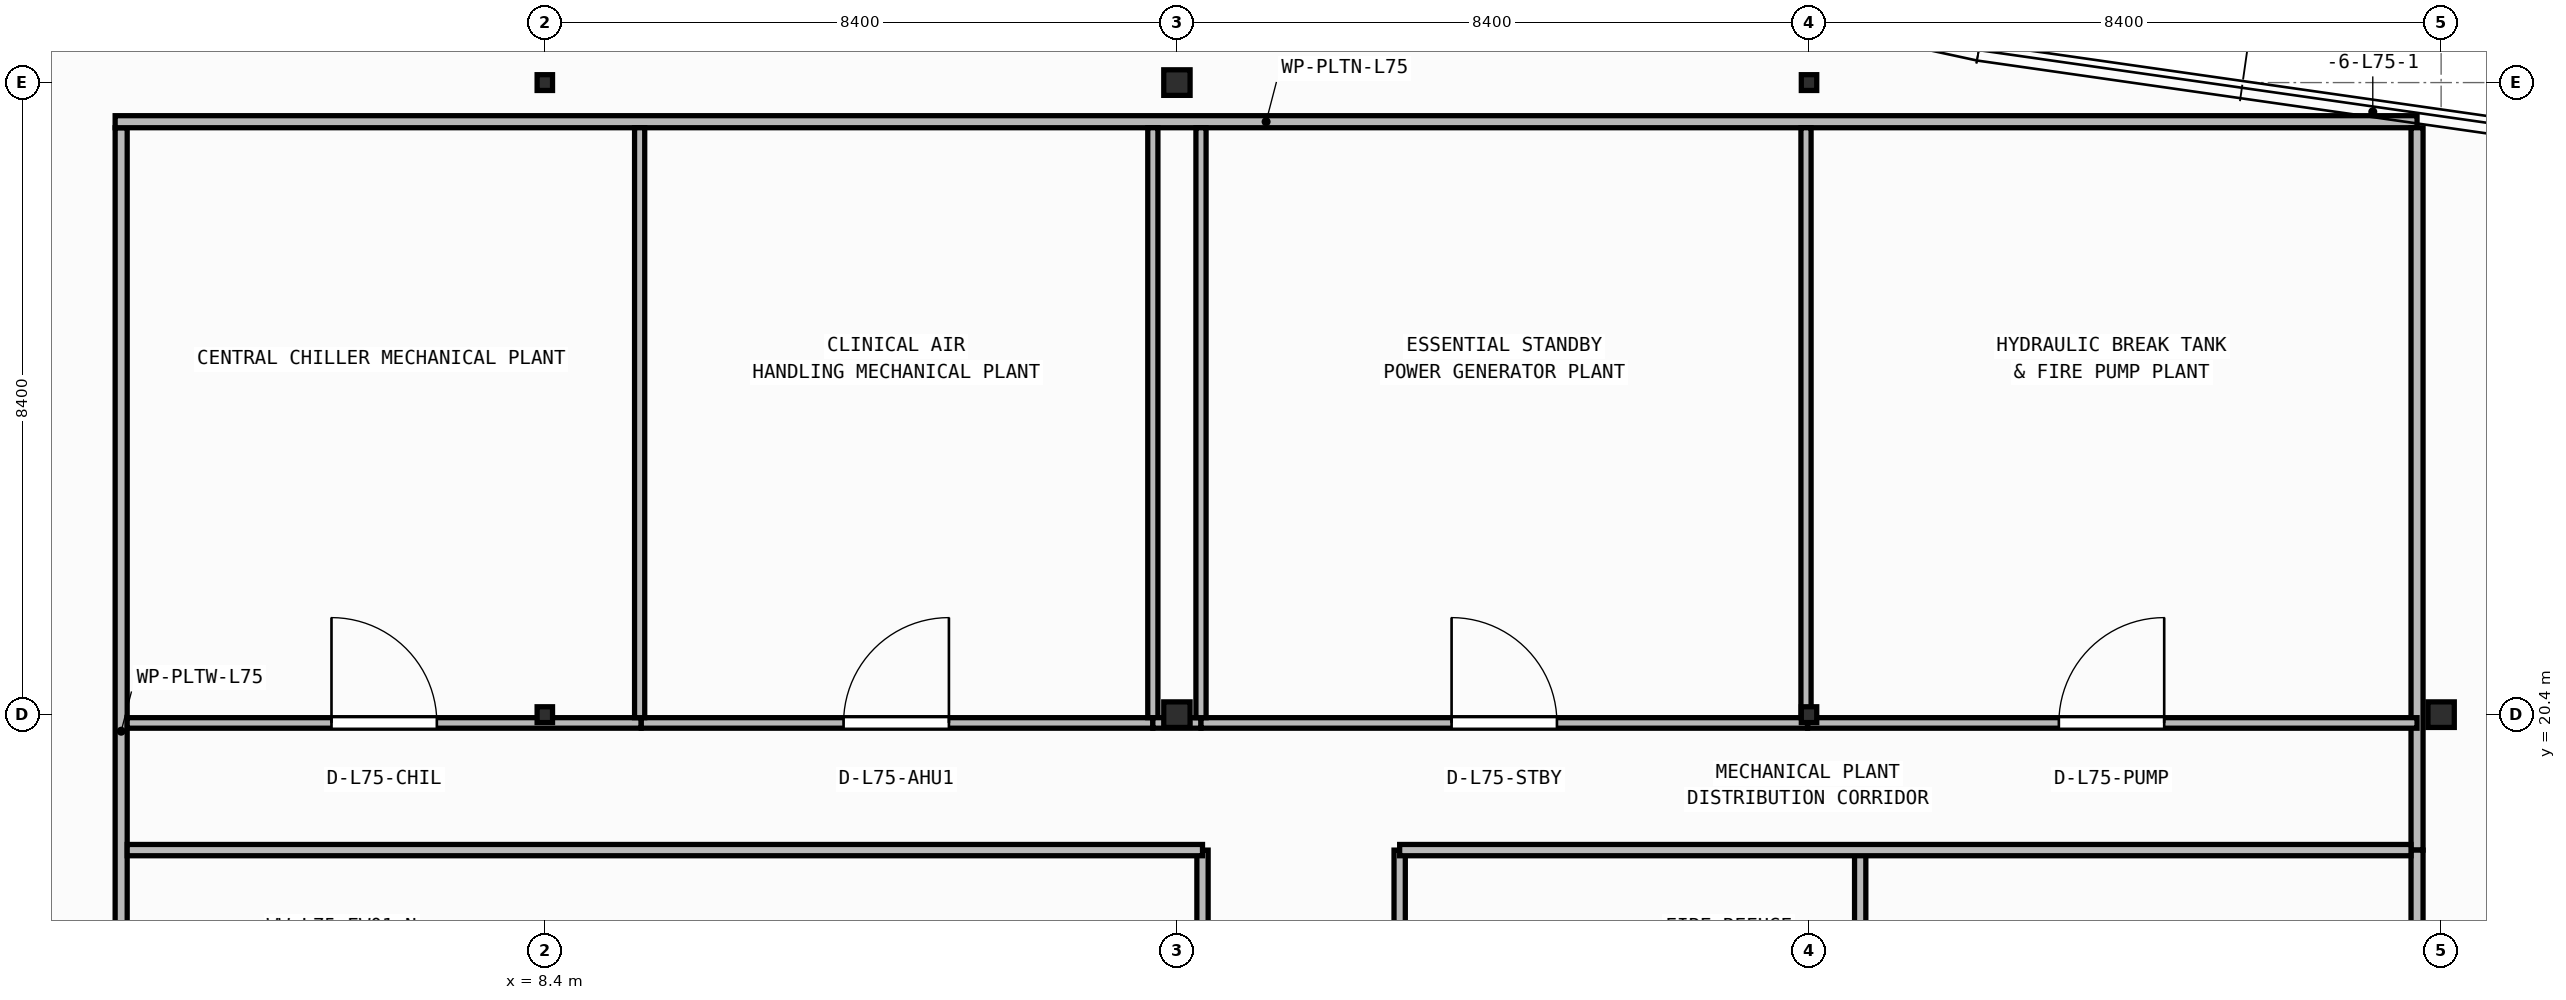
"""IFC4 building model, lengths in metres.
Left out: names, types, materials, properties, quantities, classifications, styles, units other than length and angle.
Written with IfcOpenShell. Run it as: python <this file> out.ifc"""

import sys

from ifc_helpers import new_model, si_unit, direction, frame, frame_2d, origin, origin_2d, place, context, subcontext, project, spatial, rectangle, i_section, extrude, element, fill, save


model = new_model("IFC4")
c1 = context("Model", 3, precision=1e-05, world=origin(), true_north=direction((0.0, 1.0)))
c2 = subcontext(c1, "Body", "Model", "MODEL_VIEW")
j1 = project(units=[si_unit("LENGTHUNIT", "METRE"), si_unit("PLANEANGLEUNIT", "RADIAN")], contexts=[c1])
p1 = place(None, origin())
s1 = spatial("IfcSite", under=j1, at=p1, CompositionType="ELEMENT")
p2 = place(p1, origin())
s2 = spatial("IfcBuilding", under=s1, at=p2, CompositionType="ELEMENT")
p3 = place(p2, frame((0.0, 0.0, 303.95)))
s3 = spatial("IfcBuildingStorey", under=s2, at=p3, CompositionType="ELEMENT", Elevation=303.95)
p4 = place(p3, frame((8.4, 20.4, 0.0), z_axis=(0.0, 0.0, 1.0), x_axis=(1.0, 0.0, 0.0)))
e1 = element("IfcColumn", 1, at=p4, inside=s3, PredefinedType="COLUMN", context=c2, shape_type="SweptSolid", body=[
    extrude(i_section(OverallWidth=0.205, OverallDepth=0.21, WebThickness=0.009, FlangeThickness=0.014, FilletRadius=0.011, at=origin_2d()), origin(), (0.0, 0.0, 1.0), 5.25),
])
p5 = place(p3, frame((16.8, 20.4, 0.0), z_axis=(0.0, 0.0, 1.0), x_axis=(1.0, 0.0, 0.0)))
e2 = element("IfcColumn", 2, at=p5, inside=s3, PredefinedType="COLUMN", context=c2, shape_type="SweptSolid", body=[
    extrude(i_section(OverallWidth=0.35, OverallDepth=0.34, WebThickness=0.016, FlangeThickness=0.028, at=origin_2d()), origin(), (0.0, 0.0, 1.0), 5.25),
])
p6 = place(p3, frame((25.2, 20.4, 0.0), z_axis=(0.0, 0.0, 1.0), x_axis=(1.0, 0.0, 0.0)))
e3 = element("IfcColumn", 3, at=p6, inside=s3, PredefinedType="COLUMN", context=c2, shape_type="SweptSolid", body=[
    extrude(i_section(OverallWidth=0.205, OverallDepth=0.21, WebThickness=0.009, FlangeThickness=0.014, FilletRadius=0.011, at=origin_2d()), origin(), (0.0, 0.0, 1.0), 5.25),
])
p7 = place(p3, frame((33.6, 20.4, 0.0), z_axis=(0.0, 0.0, 1.0), x_axis=(1.0, 0.0, 0.0)))
e4 = element("IfcColumn", 4, at=p7, inside=s3, PredefinedType="COLUMN", context=c2, shape_type="SweptSolid", body=[
    extrude(i_section(OverallWidth=0.35, OverallDepth=0.34, WebThickness=0.016, FlangeThickness=0.028, at=origin_2d()), origin(), (0.0, 0.0, 1.0), 5.25),
])
p8 = place(p3, frame((8.4, 28.8, 0.0), z_axis=(0.0, 0.0, 1.0), x_axis=(1.0, 0.0, 0.0)))
e5 = element("IfcColumn", 5, at=p8, inside=s3, PredefinedType="COLUMN", context=c2, shape_type="SweptSolid", body=[
    extrude(i_section(OverallWidth=0.205, OverallDepth=0.21, WebThickness=0.009, FlangeThickness=0.014, FilletRadius=0.011, at=origin_2d()), origin(), (0.0, 0.0, 1.0), 5.25),
])
p9 = place(p3, frame((16.8, 28.8, 0.0), z_axis=(0.0, 0.0, 1.0), x_axis=(1.0, 0.0, 0.0)))
e6 = element("IfcColumn", 6, at=p9, inside=s3, PredefinedType="COLUMN", context=c2, shape_type="SweptSolid", body=[
    extrude(i_section(OverallWidth=0.35, OverallDepth=0.34, WebThickness=0.016, FlangeThickness=0.028, at=origin_2d()), origin(), (0.0, 0.0, 1.0), 5.25),
])
p10 = place(p3, frame((25.2, 28.8, 0.0), z_axis=(0.0, 0.0, 1.0), x_axis=(1.0, 0.0, 0.0)))
e7 = element("IfcColumn", 7, at=p10, inside=s3, PredefinedType="COLUMN", context=c2, shape_type="SweptSolid", body=[
    extrude(i_section(OverallWidth=0.205, OverallDepth=0.21, WebThickness=0.009, FlangeThickness=0.014, FilletRadius=0.011, at=origin_2d()), origin(), (0.0, 0.0, 1.0), 5.25),
])
p11 = place(p3, frame((2.77, 12.16, 0.0), z_axis=(0.0, 0.0, 1.0), x_axis=(0.0, 1.0, 0.0)))
e8 = element("IfcWall", 8, at=p11, inside=s3, PredefinedType="PARTITIONING", context=c2, shape_type="SweptSolid", body=[
    extrude(rectangle(XDim=16.04, YDim=0.16, at=frame_2d((8.02, 0.0))), origin(), (0.0, 0.0, 1.0), 4.99),
])
p12 = place(p3, frame((2.69, 28.28, 0.0), z_axis=(0.0, 0.0, 1.0), x_axis=(1.0, 0.0, 0.0)))
e9 = element("IfcWall", 9, at=p12, inside=s3, PredefinedType="PARTITIONING", context=c2, shape_type="SweptSolid", body=[
    extrude(rectangle(XDim=30.59, YDim=0.16, at=frame_2d((15.295, 0.0))), origin(), (0.0, 0.0, 1.0), 4.99),
])
p13 = place(p3, frame((33.28, 18.6, 0.0), z_axis=(0.0, 0.0, 1.0), x_axis=(0.0, 1.0, 0.0)))
e10 = element("IfcWall", 10, at=p13, inside=s3, PredefinedType="PARTITIONING", context=c2, shape_type="SweptSolid", body=[
    extrude(rectangle(XDim=9.6, YDim=0.16, at=frame_2d((4.8, 0.0))), origin(), (0.0, 0.0, 1.0), 4.437),
])
p14 = place(p3, frame((33.28, 12.16, 0.0), z_axis=(0.0, 0.0, 1.0), x_axis=(0.0, 1.0, 0.0)))
e11 = element("IfcWall", 11, at=p14, inside=s3, PredefinedType="PARTITIONING", context=c2, shape_type="SweptSolid", body=[
    extrude(rectangle(XDim=6.44, YDim=0.16, at=frame_2d((3.22, 0.0))), origin(), (0.0, 0.0, 1.0), 4.437),
])
p15 = place(p3, frame((17.14, 14.81, 0.0), z_axis=(0.0, 0.0, 1.0), x_axis=(0.0, 1.0, 0.0)))
e12 = element("IfcWall", 12, at=p15, inside=s3, PredefinedType="PARTITIONING", context=c2, shape_type="SweptSolid", body=[
    extrude(rectangle(XDim=3.79, YDim=0.15, at=frame_2d((1.895, 0.0))), origin(), (0.0, 0.0, 1.0), 4.99),
])
p16 = place(p3, frame((2.85, 18.6, 0.0), z_axis=(0.0, 0.0, 1.0), x_axis=(1.0, 0.0, 0.0)))
e13 = element("IfcWall", 13, at=p16, inside=s3, PredefinedType="PARTITIONING", context=c2, shape_type="SweptSolid", body=[
    extrude(rectangle(XDim=14.29, YDim=0.15, at=frame_2d((7.145, 0.0))), origin(), (0.0, 0.0, 1.0), 4.99),
])
for number, where, z_axis, x_axis in (
    (14, (19.76, 14.81, 0.0), (0.0, 0.0, 1.0), (0.0, 1.0, 0.0)),
    (15, (25.88, 14.81, 0.0), (0.0, 0.0, 1.0), (0.0, 1.0, 0.0)),
):
    element("IfcWall", number, at=place(p3, frame(where, z_axis=z_axis, x_axis=x_axis)), inside=s3, PredefinedType="PARTITIONING", context=c2, shape_type="SweptSolid", body=[
        extrude(rectangle(XDim=3.79, YDim=0.15, at=frame_2d((1.895, 0.0))), origin(), (0.0, 0.0, 1.0), 4.99),
    ])
p17 = place(p3, frame((19.76, 18.6, 0.0), z_axis=(0.0, 0.0, 1.0), x_axis=(1.0, 0.0, 0.0)))
e16 = element("IfcWall", 16, at=p17, inside=s3, PredefinedType="PARTITIONING", context=c2, shape_type="SweptSolid", body=[
    extrude(rectangle(XDim=13.44, YDim=0.15, at=frame_2d((6.72, 0.0))), origin(), (0.0, 0.0, 1.0), 4.99),
])
p18 = place(p3, frame((2.85, 20.29, 0.0), z_axis=(0.0, 0.0, 1.0), x_axis=(1.0, 0.0, 0.0)))
e17 = element("IfcWall", 17, at=p18, inside=s3, PredefinedType="PARTITIONING", context=c2, shape_type="SweptSolid", body=[
    extrude(rectangle(XDim=6.83, YDim=0.14, at=frame_2d((3.415, 0.0))), origin(), (0.0, 0.0, 1.0), 4.265),
])
p19 = place(p18, frame((2.715, 0.0, 0.0)))
e18 = element("IfcOpeningElement", 18, at=p19, cuts=e17, PredefinedType="OPENING", context=c2, shape_type="SweptSolid", body=[
    extrude(rectangle(XDim=1.4, YDim=2.15, at=frame_2d((0.7, 1.075))), frame((0.0, 0.08, 0.0), z_axis=(0.0, -1.0, 0.0), x_axis=(1.0, 0.0, 0.0)), (0.0, 0.0, 1.0), 0.16),
])
p20 = place(p3, frame((9.682, 20.29, 0.0), z_axis=(0.0, 0.0, 1.0), x_axis=(1.0, 0.0, 0.0)))
e19 = element("IfcWall", 19, at=p20, inside=s3, PredefinedType="PARTITIONING", context=c2, shape_type="SweptSolid", body=[
    extrude(rectangle(XDim=6.798, YDim=0.14, at=frame_2d((3.399, 0.0))), origin(), (0.0, 0.0, 1.0), 4.265),
])
p21 = place(p20, frame((2.688, 0.0, 0.0)))
e20 = element("IfcOpeningElement", 20, at=p21, cuts=e19, PredefinedType="OPENING", context=c2, shape_type="SweptSolid", body=[
    extrude(rectangle(XDim=1.4, YDim=2.15, at=frame_2d((0.7, 1.075))), frame((0.0, 0.08, 0.0), z_axis=(0.0, -1.0, 0.0), x_axis=(1.0, 0.0, 0.0)), (0.0, 0.0, 1.0), 0.16),
])
p22 = place(p3, frame((9.66, 20.36, 0.0), z_axis=(0.0, 0.0, 1.0), x_axis=(0.0, 1.0, 0.0)))
e21 = element("IfcWall", 21, at=p22, inside=s3, PredefinedType="PARTITIONING", context=c2, shape_type="SweptSolid", body=[
    extrude(rectangle(XDim=7.84, YDim=0.135, at=frame_2d((3.92, 0.0))), origin(), (0.0, 0.0, 1.0), 4.99),
])
p23 = place(p3, frame((16.48, 20.36, 0.0), z_axis=(0.0, 0.0, 1.0), x_axis=(0.0, 1.0, 0.0)))
e22 = element("IfcWall", 22, at=p23, inside=s3, PredefinedType="PARTITIONING", context=c2, shape_type="SweptSolid", body=[
    extrude(rectangle(XDim=7.84, YDim=0.135, at=frame_2d((3.92, 0.0))), origin(), (0.0, 0.0, 1.0), 4.437),
])
p24 = place(p3, frame((16.48, 20.29, 0.0), z_axis=(0.0, 0.0, 1.0), x_axis=(1.0, 0.0, 0.0)))
e23 = element("IfcWall", 23, at=p24, inside=s3, PredefinedType="PARTITIONING", context=c2, shape_type="SweptSolid", body=[
    extrude(rectangle(XDim=0.64, YDim=0.14, at=frame_2d((0.32, 0.0))), origin(), (0.0, 0.0, 1.0), 4.265),
])
p25 = place(p3, frame((17.12, 20.29, 0.0), z_axis=(0.0, 0.0, 1.0), x_axis=(1.0, 0.0, 0.0)))
e24 = element("IfcWall", 24, at=p25, inside=s3, PredefinedType="PARTITIONING", context=c2, shape_type="SweptSolid", body=[
    extrude(rectangle(XDim=8.06, YDim=0.14, at=frame_2d((4.03, 0.0))), origin(), (0.0, 0.0, 1.0), 4.265),
])
p26 = place(p25, frame((3.33, 0.0, 0.0)))
e25 = element("IfcOpeningElement", 25, at=p26, cuts=e24, PredefinedType="OPENING", context=c2, shape_type="SweptSolid", body=[
    extrude(rectangle(XDim=1.4, YDim=2.15, at=frame_2d((0.7, 1.075))), frame((0.0, 0.08, 0.0), z_axis=(0.0, -1.0, 0.0), x_axis=(1.0, 0.0, 0.0)), (0.0, 0.0, 1.0), 0.16),
])
p27 = place(p3, frame((17.12, 20.36, 0.0), z_axis=(0.0, 0.0, 1.0), x_axis=(0.0, 1.0, 0.0)))
e26 = element("IfcWall", 26, at=p27, inside=s3, PredefinedType="PARTITIONING", context=c2, shape_type="SweptSolid", body=[
    extrude(rectangle(XDim=7.84, YDim=0.135, at=frame_2d((3.92, 0.0))), origin(), (0.0, 0.0, 1.0), 4.437),
])
p28 = place(p3, frame((25.182, 20.29, 0.0), z_axis=(0.0, 0.0, 1.0), x_axis=(1.0, 0.0, 0.0)))
e27 = element("IfcWall", 27, at=p28, inside=s3, PredefinedType="PARTITIONING", context=c2, shape_type="SweptSolid", body=[
    extrude(rectangle(XDim=8.098, YDim=0.14, at=frame_2d((4.049, 0.0))), origin(), (0.0, 0.0, 1.0), 4.265),
])
p29 = place(p28, frame((3.338, 0.0, 0.0)))
e28 = element("IfcOpeningElement", 28, at=p29, cuts=e27, PredefinedType="OPENING", context=c2, shape_type="SweptSolid", body=[
    extrude(rectangle(XDim=1.4, YDim=2.15, at=frame_2d((0.7, 1.075))), frame((0.0, 0.08, 0.0), z_axis=(0.0, -1.0, 0.0), x_axis=(1.0, 0.0, 0.0)), (0.0, 0.0, 1.0), 0.16),
])
p30 = place(p3, frame((25.16, 20.36, 0.0), z_axis=(0.0, 0.0, 1.0), x_axis=(0.0, 1.0, 0.0)))
e29 = element("IfcWall", 29, at=p30, inside=s3, PredefinedType="PARTITIONING", context=c2, shape_type="SweptSolid", body=[
    extrude(rectangle(XDim=7.84, YDim=0.135, at=frame_2d((3.92, 0.0))), origin(), (0.0, 0.0, 1.0), 4.437),
])
p31 = place(p19, origin())
e30 = element("IfcDoor", 30, at=p31, inside=s3, OperationType="SINGLE_SWING_LEFT", PredefinedType="DOOR", context=c2, shape_type="SweptSolid", body=[
    extrude(rectangle(XDim=1.4, YDim=2.15, at=frame_2d((0.7, 1.075))), frame((0.0, 0.025, 0.0), z_axis=(0.0, -1.0, 0.0), x_axis=(1.0, 0.0, 0.0)), (0.0, 0.0, 1.0), 0.05),
])
fill(e18, e30)
p32 = place(p21, origin())
e31 = element("IfcDoor", 31, at=p32, inside=s3, OperationType="SINGLE_SWING_RIGHT", PredefinedType="DOOR", context=c2, shape_type="SweptSolid", body=[
    extrude(rectangle(XDim=1.4, YDim=2.15, at=frame_2d((0.7, 1.075))), frame((0.0, 0.025, 0.0), z_axis=(0.0, -1.0, 0.0), x_axis=(1.0, 0.0, 0.0)), (0.0, 0.0, 1.0), 0.05),
])
fill(e20, e31)
p33 = place(p26, origin())
e32 = element("IfcDoor", 32, at=p33, inside=s3, OperationType="SINGLE_SWING_LEFT", PredefinedType="DOOR", context=c2, shape_type="SweptSolid", body=[
    extrude(rectangle(XDim=1.4, YDim=2.15, at=frame_2d((0.7, 1.075))), frame((0.0, 0.025, 0.0), z_axis=(0.0, -1.0, 0.0), x_axis=(1.0, 0.0, 0.0)), (0.0, 0.0, 1.0), 0.05),
])
fill(e25, e32)
p34 = place(p29, origin())
e33 = element("IfcDoor", 33, at=p34, inside=s3, OperationType="SINGLE_SWING_RIGHT", PredefinedType="DOOR", context=c2, shape_type="SweptSolid", body=[
    extrude(rectangle(XDim=1.4, YDim=2.15, at=frame_2d((0.7, 1.075))), frame((0.0, 0.025, 0.0), z_axis=(0.0, -1.0, 0.0), x_axis=(1.0, 0.0, 0.0)), (0.0, 0.0, 1.0), 0.05),
])
fill(e28, e33)
save(model, sys.argv[1])
